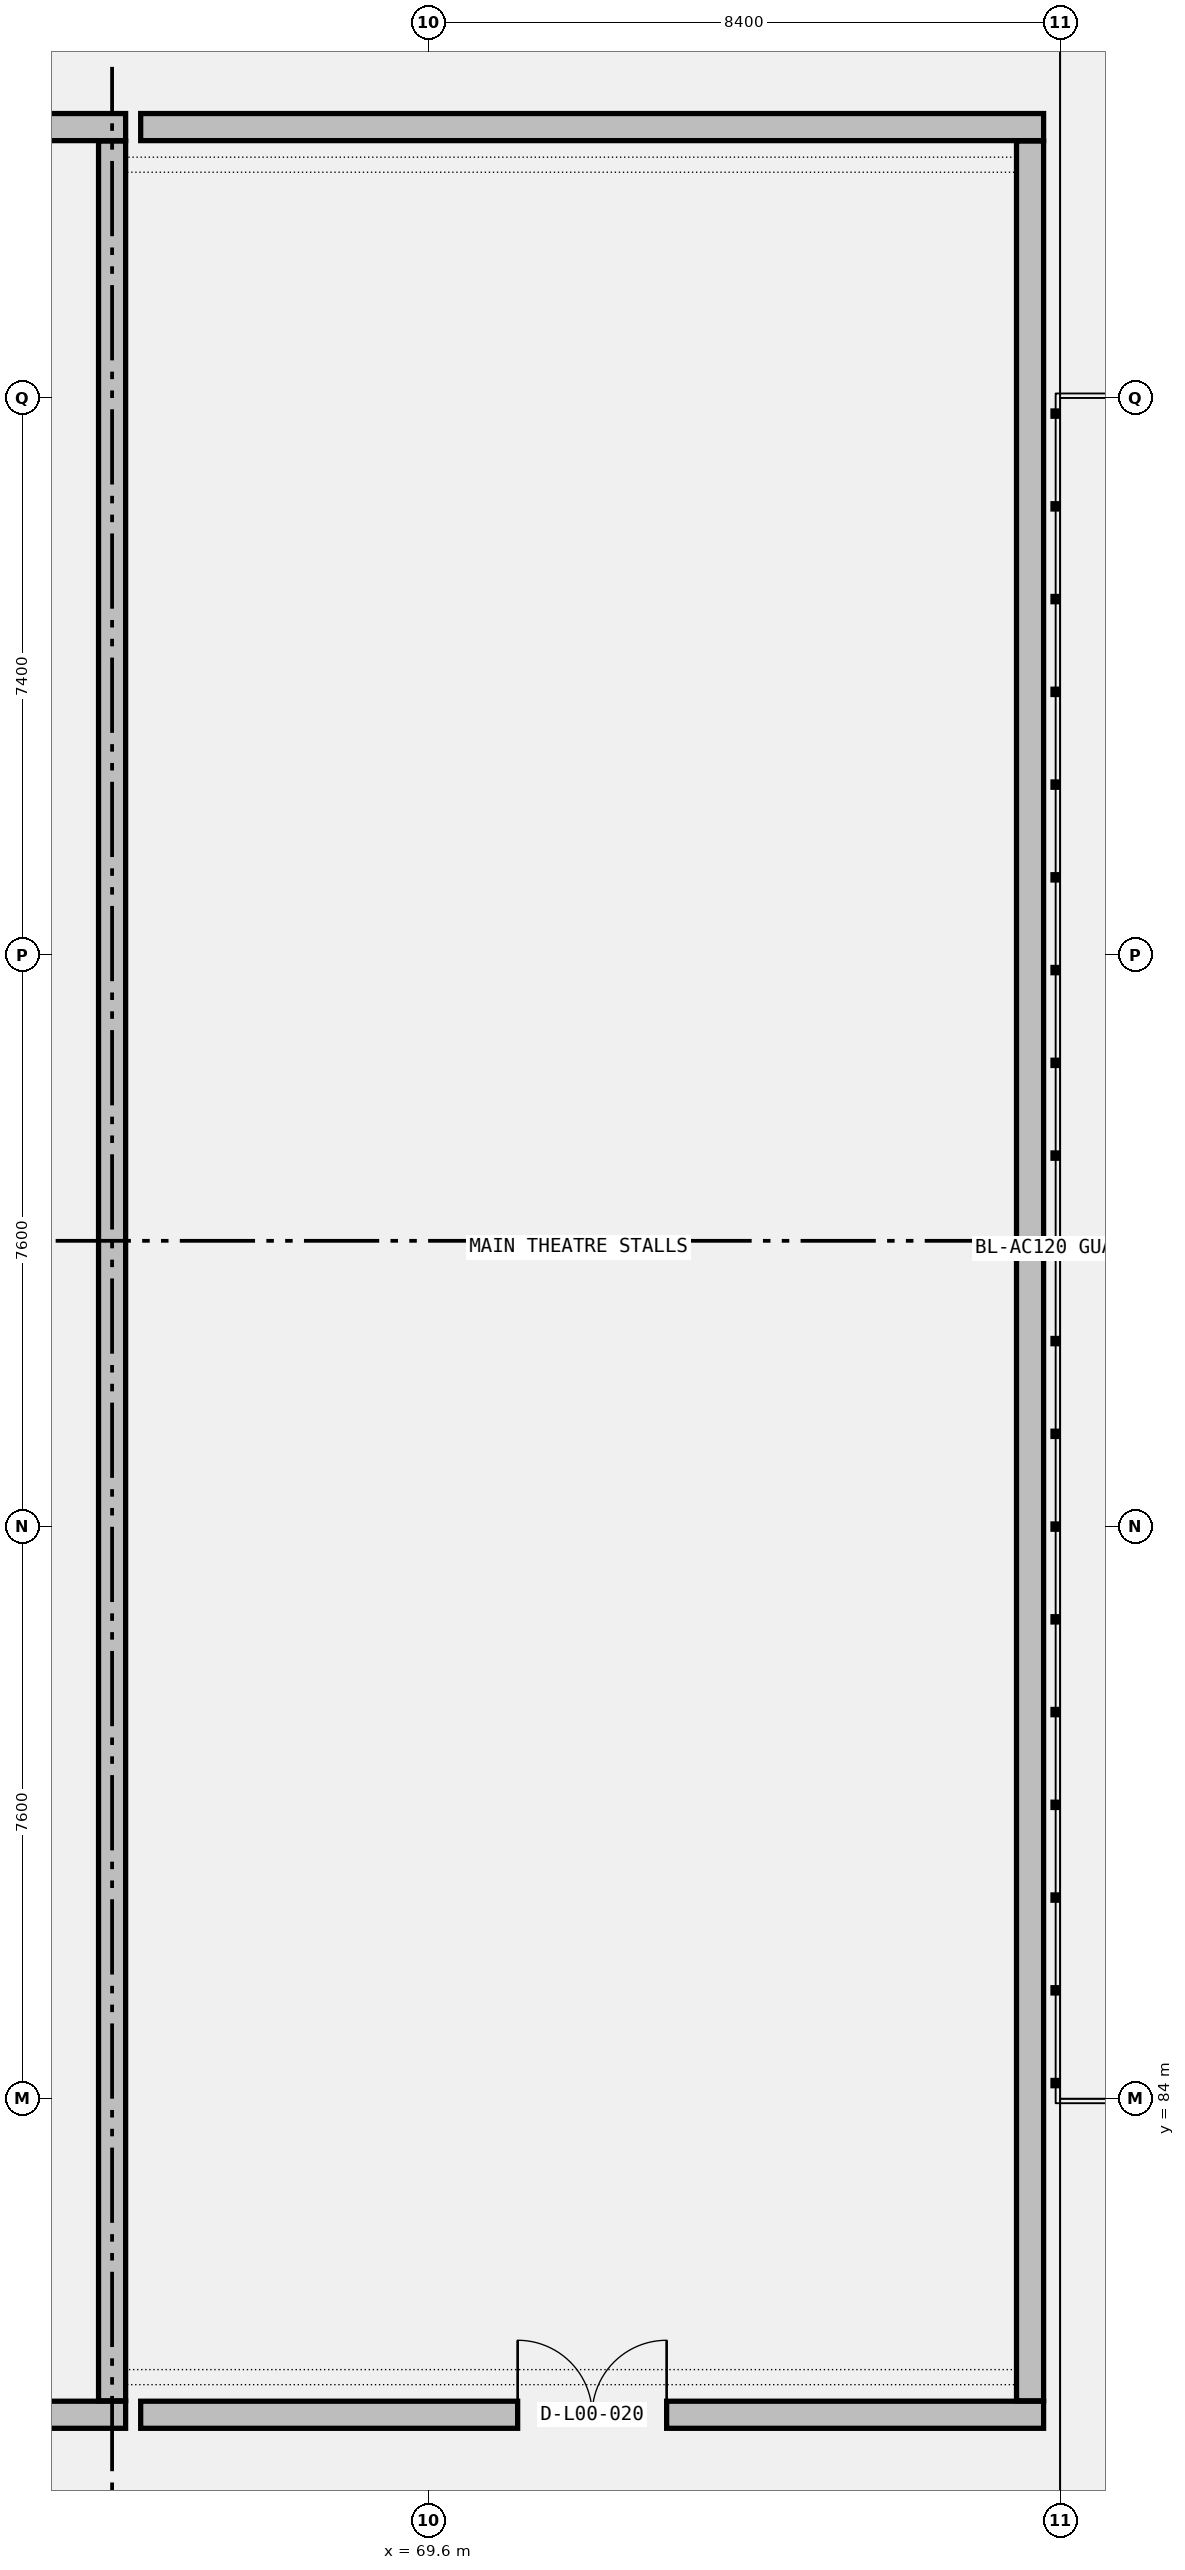
"""IFC4 building model, lengths in metres.
Left out: names, types, materials, properties, quantities, classifications, styles, units other than length and angle.
Written with IfcOpenShell. Run it as: python <this file> out.ifc"""

import sys

from ifc_helpers import new_model, si_unit, direction, frame, frame_2d, origin, place, context, subcontext, project, spatial, rectangle, extrude, element, fill, save


model = new_model("IFC4")
c1 = context("Model", 3, precision=1e-05, world=origin(), true_north=direction((0.0, 1.0)))
c2 = subcontext(c1, "Body", "Model", "MODEL_VIEW")
j1 = project(units=[si_unit("LENGTHUNIT", "METRE"), si_unit("PLANEANGLEUNIT", "RADIAN")], contexts=[c1])
p1 = place(None, origin())
s1 = spatial("IfcSite", under=j1, at=p1, CompositionType="ELEMENT")
p2 = place(p1, origin())
s2 = spatial("IfcBuilding", under=s1, at=p2, CompositionType="ELEMENT")
p3 = place(p2, origin())
s3 = spatial("IfcBuildingStorey", under=s2, at=p3, CompositionType="ELEMENT", Elevation=0.0)
p4 = place(p3, frame((55.82, 79.8, 0.0), z_axis=(0.0, 0.0, 1.0), x_axis=(1.0, 0.0, 0.0)))
e1 = element("IfcWall", 1, at=p4, inside=s3, PredefinedType="PARTITIONING", context=c2, shape_type="SweptSolid", body=[
    extrude(rectangle(XDim=9.76, YDim=0.36, at=frame_2d((4.88, 0.0))), origin(), (0.0, 0.0, 1.0), 4.55),
])
p5 = place(p4, frame((3.98, 0.0, 0.0)))
e2 = element("IfcOpeningElement", 2, at=p5, cuts=e1, PredefinedType="OPENING", context=c2, shape_type="SweptSolid", body=[
    extrude(rectangle(XDim=1.8, YDim=2.4, at=frame_2d((0.9, 1.2))), frame((0.0, 0.19, 0.0), z_axis=(0.0, -1.0, 0.0), x_axis=(1.0, 0.0, 0.0)), (0.0, 0.0, 1.0), 0.38),
])
p6 = place(p3, frame((55.82, 110.2, 0.0), z_axis=(0.0, 0.0, 1.0), x_axis=(1.0, 0.0, 0.0)))
e3 = element("IfcWall", 3, at=p6, inside=s3, PredefinedType="PARTITIONING", context=c2, shape_type="SweptSolid", body=[
    extrude(rectangle(XDim=9.76, YDim=0.36, at=frame_2d((4.88, 0.0))), origin(), (0.0, 0.0, 1.0), 4.55),
])
p7 = place(p3, frame((65.4, 79.986, 0.0), z_axis=(0.0, 0.0, 1.0), x_axis=(0.0, 1.0, 0.0)))
e4 = element("IfcWall", 4, at=p7, inside=s3, PredefinedType="PARTITIONING", context=c2, shape_type="SweptSolid", body=[
    extrude(rectangle(XDim=30.028, YDim=0.36, at=frame_2d((15.014, 0.0))), origin(), (0.0, 0.0, 1.0), 5.16),
])
p8 = place(p3, frame((65.78, 79.8, 0.0), z_axis=(0.0, 0.0, 1.0), x_axis=(1.0, 0.0, 0.0)))
e5 = element("IfcWall", 5, at=p8, inside=s3, PredefinedType="PARTITIONING", context=c2, shape_type="SweptSolid", body=[
    extrude(rectangle(XDim=12.0, YDim=0.36, at=frame_2d((6.0, 0.0))), origin(), (0.0, 0.0, 1.0), 5.16),
])
p9 = place(p8, frame((5.01, 0.0, 0.0)))
e6 = element("IfcOpeningElement", 6, at=p9, cuts=e5, PredefinedType="OPENING", context=c2, shape_type="SweptSolid", body=[
    extrude(rectangle(XDim=1.98, YDim=2.48, at=frame_2d((0.99, 1.24))), frame((0.0, 0.19, 0.0), z_axis=(0.0, -1.0, 0.0), x_axis=(1.0, 0.0, 0.0)), (0.0, 0.0, 1.0), 0.38),
])
p10 = place(p3, frame((65.78, 110.2, 0.0), z_axis=(0.0, 0.0, 1.0), x_axis=(1.0, 0.0, 0.0)))
e7 = element("IfcWall", 7, at=p10, inside=s3, PredefinedType="PARTITIONING", context=c2, shape_type="SweptSolid", body=[
    extrude(rectangle(XDim=12.0, YDim=0.36, at=frame_2d((6.0, 0.0))), origin(), (0.0, 0.0, 1.0), 5.16),
])
p11 = place(p3, frame((77.6, 79.986, 0.0), z_axis=(0.0, 0.0, 1.0), x_axis=(0.0, 1.0, 0.0)))
e8 = element("IfcWall", 8, at=p11, inside=s3, PredefinedType="PARTITIONING", context=c2, shape_type="SweptSolid", body=[
    extrude(rectangle(XDim=30.028, YDim=0.36, at=frame_2d((15.014, 0.0))), origin(), (0.0, 0.0, 1.0), 5.16),
])
p12 = place(p9, origin())
e9 = element("IfcDoor", 9, at=p12, inside=s3, OperationType="DOUBLE_DOOR_SINGLE_SWING", PredefinedType="DOOR", context=c2, shape_type="SweptSolid", body=[
    extrude(rectangle(XDim=1.98, YDim=2.48, at=frame_2d((0.99, 1.24))), frame((0.0, 0.025, 0.0), z_axis=(0.0, -1.0, 0.0), x_axis=(1.0, 0.0, 0.0)), (0.0, 0.0, 1.0), 0.05),
])
fill(e6, e9)
save(model, sys.argv[1])
